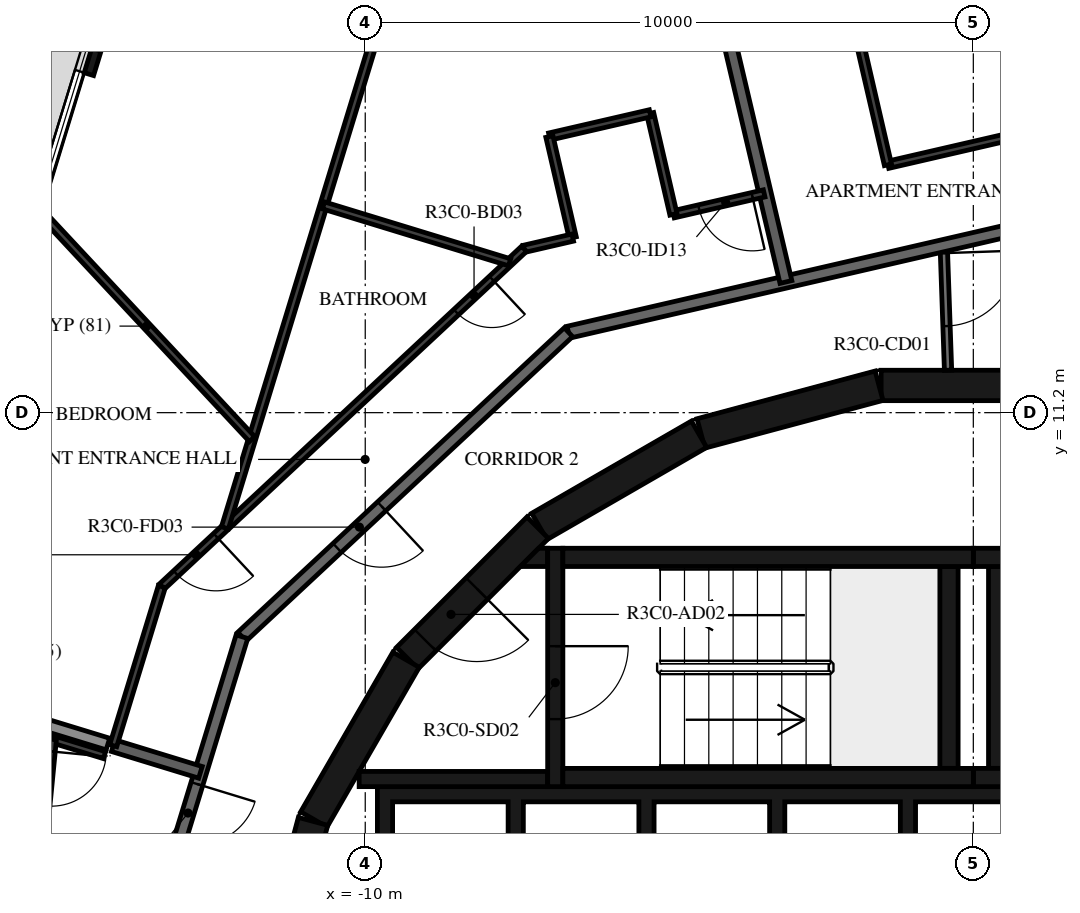
"""IFC4 building model, lengths in metres.
Left out: names, types, materials, properties, quantities, classifications, styles, units other than length and angle.
Written with IfcOpenShell. Run it as: python <this file> out.ifc"""

import sys

from ifc_helpers import new_model, si_unit, direction, frame, frame_2d, origin, place, context, subcontext, project, spatial, polyline, rectangle, outline, extrude, element, fill, save


model = new_model("IFC4")
c1 = context("Model", 3, precision=1e-05, world=origin(), true_north=direction((0.0, 1.0)))
c2 = subcontext(c1, "Body", "Model", "MODEL_VIEW")
j1 = project(units=[si_unit("LENGTHUNIT", "METRE"), si_unit("PLANEANGLEUNIT", "RADIAN")], contexts=[c1])
p1 = place(None, origin())
s1 = spatial("IfcSite", under=j1, at=p1, CompositionType="ELEMENT")
p2 = place(p1, origin())
s2 = spatial("IfcBuilding", under=s1, at=p2, CompositionType="ELEMENT")
p3 = place(p2, frame((0.0, 0.0, 134.4)))
s3 = spatial("IfcBuildingStorey", under=s2, at=p3, CompositionType="ELEMENT", Elevation=134.4)
p4 = place(p3, frame((-13.609, 19.827, 0.0), z_axis=(0.0, 0.0, 1.0), x_axis=(-0.292348395078, -0.956311882126, 0.0)))
e1 = element("IfcWall", 1, at=p4, inside=s3, PredefinedType="STANDARD", context=c2, shape_type="SweptSolid", body=[
    extrude(rectangle(XDim=3.2, YDim=0.16, at=frame_2d((1.6, 0.0))), origin(), (0.0, 0.0, 1.0), 3.12),
])
p5 = place(p4, frame((0.4, 0.0, 0.0)))
e2 = element("IfcOpeningElement", 2, at=p5, cuts=e1, PredefinedType="OPENING", context=c2, shape_type="SweptSolid", body=[
    extrude(rectangle(XDim=2.4, YDim=2.4, at=frame_2d((1.2, 1.2))), frame((0.0, 0.09, 0.0), z_axis=(0.0, -1.0, 0.0), x_axis=(1.0, 0.0, 0.0)), (0.0, 0.0, 1.0), 0.18),
])
for number, where, z_axis, x_axis in (
    (3, (1.516, 11.647, 0.0), (0.0, 0.0, 1.0), (-1.0, 0.0, 0.0)),
    (4, (-1.55, 11.643, 0.0), (0.0, 0.0, 1.0), (-0.966, -0.259, 0.0)),
    (5, (-4.51, 10.845, 0.0), (0.0, 0.0, 1.0), (-0.866, -0.5, 0.0)),
):
    element("IfcWall", number, at=place(p3, frame(where, z_axis=z_axis, x_axis=x_axis)), inside=s3, PredefinedType="SHEAR", context=c2, shape_type="SweptSolid", body=[
        extrude(rectangle(XDim=3.033, YDim=0.5, at=frame_2d((1.516, 0.0))), origin(), (0.0, 0.0, 1.0), 3.12),
    ])
p6 = place(p3, frame((-7.164, 9.308, 0.0), z_axis=(0.0, 0.0, 1.0), x_axis=(-0.707106781187, -0.707106781187, 0.0)))
e6 = element("IfcWall", 6, at=p6, inside=s3, PredefinedType="SHEAR", context=c2, shape_type="SweptSolid", body=[
    extrude(rectangle(XDim=3.032, YDim=0.5, at=frame_2d((1.516, 0.0))), origin(), (0.0, 0.0, 1.0), 3.12),
])
p7 = place(p6, frame((1.416, 0.0, 0.0)))
e7 = element("IfcOpeningElement", 7, at=p7, cuts=e6, PredefinedType="OPENING", context=c2, shape_type="SweptSolid", body=[
    extrude(rectangle(XDim=1.2, YDim=2.1, at=frame_2d((0.6, 1.05))), frame((0.0, 0.26, 0.0), z_axis=(0.0, -1.0, 0.0), x_axis=(1.0, 0.0, 0.0)), (0.0, 0.0, 1.0), 0.52),
])
for number, where, z_axis, x_axis in (
    (8, (-9.329, 7.137, 0.0), (0.0, 0.0, 1.0), (-0.5, -0.866, 0.0)),
    (9, (-10.858, 4.479, 0.0), (0.0, 0.0, 1.0), (-0.259, -0.966, 0.0)),
):
    element("IfcWall", number, at=place(p3, frame(where, z_axis=z_axis, x_axis=x_axis)), inside=s3, PredefinedType="SHEAR", context=c2, shape_type="SweptSolid", body=[
        extrude(rectangle(XDim=3.033, YDim=0.5, at=frame_2d((1.516, 0.0))), origin(), (0.0, 0.0, 1.0), 3.12),
    ])
for number, where, z_axis, x_axis in (
    (10, (0.0, 5.2, 0.0), (0.0, 0.0, 1.0), (1.0, 0.0, 0.0)),
    (11, (0.0, 8.82, 0.0), (0.0, 0.0, 1.0), (1.0, 0.0, 0.0)),
):
    element("IfcWall", number, at=place(p3, frame(where, z_axis=z_axis, x_axis=x_axis)), inside=s3, PredefinedType="SHEAR", context=c2, shape_type="SweptSolid", body=[
        extrude(rectangle(XDim=6.75, YDim=0.3, at=frame_2d((3.375, 0.0))), origin(), (0.0, 0.0, 1.0), 3.12),
    ])
p8 = place(p3, frame((0.4, 5.35, 0.0), z_axis=(0.0, 0.0, 1.0), x_axis=(0.0, 1.0, 0.0)))
e12 = element("IfcWall", 12, at=p8, inside=s3, PredefinedType="SHEAR", context=c2, shape_type="SweptSolid", body=[
    extrude(rectangle(XDim=3.32, YDim=0.3, at=frame_2d((1.66, 0.0))), origin(), (0.0, 0.0, 1.0), 3.12),
])
for number, where, z_axis, x_axis in (
    (13, (-6.75, 5.2, 0.0), (0.0, 0.0, 1.0), (1.0, 0.0, 0.0)),
    (14, (-6.75, 8.82, 0.0), (0.0, 0.0, 1.0), (1.0, 0.0, 0.0)),
):
    element("IfcWall", number, at=place(p3, frame(where, z_axis=z_axis, x_axis=x_axis)), inside=s3, PredefinedType="SHEAR", context=c2, shape_type="SweptSolid", body=[
        extrude(rectangle(XDim=6.75, YDim=0.3, at=frame_2d((3.375, 0.0))), origin(), (0.0, 0.0, 1.0), 3.12),
    ])
p9 = place(p3, frame((-0.4, 5.35, 0.0), z_axis=(0.0, 0.0, 1.0), x_axis=(0.0, 1.0, 0.0)))
e15 = element("IfcWall", 15, at=p9, inside=s3, PredefinedType="SHEAR", context=c2, shape_type="SweptSolid", body=[
    extrude(rectangle(XDim=3.32, YDim=0.3, at=frame_2d((1.66, 0.0))), origin(), (0.0, 0.0, 1.0), 3.12),
])
p10 = place(p3, frame((-6.875, 8.97, 0.0), z_axis=(0.0, 0.0, 1.0), x_axis=(0.0, -1.0, 0.0)))
e16 = element("IfcWall", 16, at=p10, inside=s3, PredefinedType="SHEAR", context=c2, shape_type="SweptSolid", body=[
    extrude(rectangle(XDim=3.92, YDim=0.25, at=frame_2d((1.96, 0.0))), origin(), (0.0, 0.0, 1.0), 3.12),
])
p11 = place(p10, frame((1.61, 0.0, 0.0)))
e17 = element("IfcOpeningElement", 17, at=p11, cuts=e16, PredefinedType="OPENING", context=c2, shape_type="SweptSolid", body=[
    extrude(rectangle(XDim=1.2, YDim=2.1, at=frame_2d((0.6, 1.05))), frame((0.0, 0.135, 0.0), z_axis=(0.0, -1.0, 0.0), x_axis=(1.0, 0.0, 0.0)), (0.0, 0.0, 1.0), 0.27),
])
p12 = place(p3, frame((-7.0, 5.175, 0.0), z_axis=(0.0, 0.0, 1.0), x_axis=(-1.0, 0.0, 0.0)))
e18 = element("IfcWall", 18, at=p12, inside=s3, PredefinedType="SHEAR", context=c2, shape_type="SweptSolid", body=[
    extrude(rectangle(XDim=3.1, YDim=0.25, at=frame_2d((1.55, 0.0))), origin(), (0.0, 0.0, 1.0), 3.12),
])
p13 = place(p3, origin())
e19 = element("IfcWall", 19, at=p13, inside=s3, PredefinedType="SHEAR", context=c2, shape_type="SweptSolid", body=[
    extrude(outline(polyline([(-7.148, 8.97), (-7.0, 8.97), (-7.0, 8.67), (-7.448, 8.67), (-7.148, 8.97)])), origin(), (0.0, 0.0, 1.0), 3.12),
])
p14 = place(p3, origin())
e20 = element("IfcWall", 20, at=p14, inside=s3, PredefinedType="SHEAR", context=c2, shape_type="SweptSolid", body=[
    extrude(outline(polyline([(-9.55, 4.8), (-7.65, 4.8), (-7.65, 1.9), (-7.4, 1.9), (-7.4, 4.8), (-5.5, 4.8), (-5.5, 1.9), (-5.25, 1.9), (-5.25, 4.8), (-3.35, 4.8), (-3.35, 1.9), (-3.1, 1.9), (-3.1, 4.8), (-1.2, 4.8), (-1.2, 1.9), (-0.95, 1.9), (-0.95, 4.8), (0.95, 4.8), (0.95, 1.9), (1.2, 1.9), (1.2, 4.8), (3.1, 4.8), (3.1, 1.9), (3.35, 1.9), (3.35, 4.8), (5.25, 4.8), (5.25, 1.9), (5.5, 1.9), (5.5, 4.8), (7.4, 4.8), (7.4, 1.9), (7.65, 1.9), (7.65, 4.8), (9.55, 4.8), (9.55, 1.9), (9.8, 1.9), (9.8, 4.8), (9.8, 5.05), (-9.8, 5.05), (-9.8, 4.8), (-9.8, 1.9), (-9.55, 1.9), (-9.55, 4.8)])), origin(), (0.0, 0.0, 1.0), 3.12),
])
p15 = place(p3, frame((-0.487, 13.948, 0.0), z_axis=(0.0, 0.0, 1.0), x_axis=(0.034859752231, -0.999392214135, 0.0)))
e21 = element("IfcWall", 21, at=p15, inside=s3, PredefinedType="PARTITIONING", context=c2, shape_type="SweptSolid", body=[
    extrude(rectangle(XDim=2.052, YDim=0.12, at=frame_2d((1.026, 0.0))), origin(), (0.0, 0.0, 1.0), 3.12),
])
p16 = place(p15, frame((0.125, 0.0, 0.0)))
e22 = element("IfcOpeningElement", 22, at=p16, cuts=e21, PredefinedType="OPENING", context=c2, shape_type="SweptSolid", body=[
    extrude(rectangle(XDim=1.2, YDim=2.1, at=frame_2d((0.6, 1.05))), frame((0.0, 0.07, 0.0), z_axis=(0.0, -1.0, 0.0), x_axis=(1.0, 0.0, 0.0)), (0.0, 0.0, 1.0), 0.14),
])
p17 = place(p3, frame((0.495, 14.175, 0.0), z_axis=(0.0, 0.0, 1.0), x_axis=(-0.974376622151, -0.224922649383, 0.0)))
e23 = element("IfcWall", 23, at=p17, inside=s3, PredefinedType="STANDARD", context=c2, shape_type="SweptSolid", body=[
    extrude(rectangle(XDim=7.342, YDim=0.2, at=frame_2d((3.671, 0.0))), origin(), (0.0, 0.0, 1.0), 3.12),
])
p18 = place(p3, frame((-6.659, 12.523, 0.0), z_axis=(0.0, 0.0, 1.0), x_axis=(-0.731350455479, -0.682001841105, 0.0)))
e24 = element("IfcWall", 24, at=p18, inside=s3, PredefinedType="STANDARD", context=c2, shape_type="SweptSolid", body=[
    extrude(rectangle(XDim=7.342, YDim=0.2, at=frame_2d((3.671, 0.0))), origin(), (0.0, 0.0, 1.0), 3.12),
])
p19 = place(p18, frame((4.2, 0.0, 0.0)))
e25 = element("IfcOpeningElement", 25, at=p19, cuts=e24, PredefinedType="OPENING", context=c2, shape_type="SweptSolid", body=[
    extrude(rectangle(XDim=1.0, YDim=2.1, at=frame_2d((0.5, 1.05))), frame((0.0, 0.11, 0.0), z_axis=(0.0, -1.0, 0.0), x_axis=(1.0, 0.0, 0.0)), (0.0, 0.0, 1.0), 0.22),
])
p20 = place(p3, frame((-12.028, 7.516, 0.0), z_axis=(0.0, 0.0, 1.0), x_axis=(-0.292365533182, -0.956306642771, 0.0)))
e26 = element("IfcWall", 26, at=p20, inside=s3, PredefinedType="STANDARD", context=c2, shape_type="SweptSolid", body=[
    extrude(rectangle(XDim=7.342, YDim=0.2, at=frame_2d((3.671, 0.0))), origin(), (0.0, 0.0, 1.0), 3.12),
])
p21 = place(p20, frame((2.533, 0.0, 0.0)))
e27 = element("IfcOpeningElement", 27, at=p21, cuts=e26, PredefinedType="OPENING", context=c2, shape_type="SweptSolid", body=[
    extrude(rectangle(XDim=1.0, YDim=2.1, at=frame_2d((0.5, 1.05))), frame((0.0, 0.11, 0.0), z_axis=(0.0, -1.0, 0.0), x_axis=(1.0, 0.0, 0.0)), (0.0, 0.0, 1.0), 0.22),
])
p22 = place(p3, frame((-4.281, 18.448, 0.0), z_axis=(0.0, 0.0, 1.0), x_axis=(0.228867856942, -0.973457499873, 0.0)))
e28 = element("IfcWall", 28, at=p22, inside=s3, PredefinedType="STANDARD", context=c2, shape_type="SweptSolid", body=[
    extrude(rectangle(XDim=5.238, YDim=0.2, at=frame_2d((2.619, 0.0))), origin(), (0.0, 0.0, 1.0), 3.12),
])
p23 = place(p3, frame((-14.145, 5.724, 0.0), z_axis=(0.0, 0.0, 1.0), x_axis=(0.956266872747, -0.292495586439, 0.0)))
e29 = element("IfcWall", 29, at=p23, inside=s3, PredefinedType="STANDARD", context=c2, shape_type="SweptSolid", body=[
    extrude(rectangle(XDim=1.5, YDim=0.2, at=frame_2d((0.75, 0.0))), origin(), (0.0, 0.0, 1.0), 3.12),
])
p24 = place(p3, frame((-17.674, 6.803, 0.0), z_axis=(0.0, 0.0, 1.0), x_axis=(0.956293645939, -0.292408041504, 0.0)))
e30 = element("IfcWall", 30, at=p24, inside=s3, PredefinedType="STANDARD", context=c2, shape_type="SweptSolid", body=[
    extrude(rectangle(XDim=3.6, YDim=0.2, at=frame_2d((1.8, 0.0))), origin(), (0.0, 0.0, 1.0), 2.73),
])
p25 = place(p3, frame((0.549, 15.727, 0.0), z_axis=(0.0, 0.0, 1.0), x_axis=(-0.97436861061, -0.224957352975, 0.0)))
e31 = element("IfcWall", 31, at=p25, inside=s3, PredefinedType="PARTITIONING", context=c2, shape_type="SweptSolid", body=[
    extrude(rectangle(XDim=2.004, YDim=0.12, at=frame_2d((1.002, 0.0))), origin(), (0.0, 0.0, 1.0), 3.12),
])
p26 = place(p3, frame((-1.404, 15.276, 0.0), z_axis=(0.0, 0.0, 1.0), x_axis=(-0.224947305813, 0.974370930194, 0.0)))
e32 = element("IfcWall", 32, at=p26, inside=s3, PredefinedType="PARTITIONING", context=c2, shape_type="SweptSolid", body=[
    extrude(rectangle(XDim=5.28, YDim=0.12, at=frame_2d((2.64, 0.0))), origin(), (0.0, 0.0, 1.0), 3.12),
])
p27 = place(p3, frame((-1.539, 24.071, 0.0), z_axis=(0.0, 0.0, 1.0), x_axis=(0.68200220595, -0.731350115252, 0.0)))
e33 = element("IfcWall", 33, at=p27, inside=s3, PredefinedType="PARTITIONING", context=c2, shape_type="SweptSolid", body=[
    extrude(rectangle(XDim=17.316, YDim=0.12, at=frame_2d((8.658, 0.0))), origin(), (0.0, 0.0, 1.0), 3.12),
])
p28 = place(p27, frame((3.323, 0.0, 0.0)))
e34 = element("IfcOpeningElement", 34, at=p28, cuts=e33, PredefinedType="OPENING", context=c2, shape_type="SweptSolid", body=[
    extrude(rectangle(XDim=0.9, YDim=2.1, at=frame_2d((0.45, 1.05))), frame((0.0, 0.07, 0.0), z_axis=(0.0, -1.0, 0.0), x_axis=(1.0, 0.0, 0.0)), (0.0, 0.0, 1.0), 0.14),
])
p29 = place(p27, frame((0.2, 0.0, 0.0)))
e35 = element("IfcOpeningElement", 35, at=p29, cuts=e33, PredefinedType="OPENING", context=c2, shape_type="SweptSolid", body=[
    extrude(rectangle(XDim=0.9, YDim=2.1, at=frame_2d((0.45, 1.05))), frame((0.0, 0.07, 0.0), z_axis=(0.0, -1.0, 0.0), x_axis=(1.0, 0.0, 0.0)), (0.0, 0.0, 1.0), 0.14),
])
p30 = place(p3, frame((-3.44, 14.806, 0.0), z_axis=(0.0, 0.0, 1.0), x_axis=(-0.974356244071, -0.225010910046, 0.0)))
e36 = element("IfcWall", 36, at=p30, inside=s3, PredefinedType="PARTITIONING", context=c2, shape_type="SweptSolid", body=[
    extrude(rectangle(XDim=1.531, YDim=0.12, at=frame_2d((0.766, 0.0))), origin(), (0.0, 0.0, 1.0), 3.12),
])
p31 = place(p30, frame((0.2, 0.0, 0.0)))
e37 = element("IfcOpeningElement", 37, at=p31, cuts=e36, PredefinedType="OPENING", context=c2, shape_type="SweptSolid", body=[
    extrude(rectangle(XDim=0.9, YDim=2.1, at=frame_2d((0.45, 1.05))), frame((0.0, 0.07, 0.0), z_axis=(0.0, -1.0, 0.0), x_axis=(1.0, 0.0, 0.0)), (0.0, 0.0, 1.0), 0.14),
])
p32 = place(p3, frame((-4.931, 14.461, 0.0), z_axis=(0.0, 0.0, 1.0), x_axis=(-0.224911785629, 0.974379129849, 0.0)))
e38 = element("IfcWall", 38, at=p32, inside=s3, PredefinedType="PARTITIONING", context=c2, shape_type="SweptSolid", body=[
    extrude(rectangle(XDim=1.705, YDim=0.12, at=frame_2d((0.853, 0.0))), origin(), (0.0, 0.0, 1.0), 3.12),
])
p33 = place(p3, frame((-5.315, 16.123, 0.0), z_axis=(0.0, 0.0, 1.0), x_axis=(-0.974352456598, -0.225027310168, 0.0)))
e39 = element("IfcWall", 39, at=p33, inside=s3, PredefinedType="PARTITIONING", context=c2, shape_type="SweptSolid", body=[
    extrude(rectangle(XDim=1.7, YDim=0.12, at=frame_2d((0.85, 0.0))), origin(), (0.0, 0.0, 1.0), 3.12),
])
p34 = place(p3, frame((-6.971, 15.74, 0.0), z_axis=(0.0, 0.0, 1.0), x_axis=(0.224943164347, -0.974371886301, 0.0)))
e40 = element("IfcWall", 40, at=p34, inside=s3, PredefinedType="PARTITIONING", context=c2, shape_type="SweptSolid", body=[
    extrude(rectangle(XDim=1.705, YDim=0.12, at=frame_2d((0.853, 0.0))), origin(), (0.0, 0.0, 1.0), 3.12),
])
p35 = place(p3, frame((-6.588, 14.079, 0.0), z_axis=(0.0, 0.0, 1.0), x_axis=(-0.974391195695, -0.224859506699, 0.0)))
e41 = element("IfcWall", 41, at=p35, inside=s3, PredefinedType="PARTITIONING", context=c2, shape_type="SweptSolid", body=[
    extrude(rectangle(XDim=0.821, YDim=0.12, at=frame_2d((0.41, 0.0))), origin(), (0.0, 0.0, 1.0), 3.12),
])
p36 = place(p3, frame((-7.388, 13.894, 0.0), z_axis=(0.0, 0.0, 1.0), x_axis=(-0.731357186721, -0.681994622729, 0.0)))
e42 = element("IfcWall", 42, at=p36, inside=s3, PredefinedType="PARTITIONING", context=c2, shape_type="SweptSolid", body=[
    extrude(rectangle(XDim=8.146, YDim=0.12, at=frame_2d((4.073, 0.0))), origin(), (0.0, 0.0, 1.0), 3.12),
])
p37 = place(p36, frame((0.725, 0.0, 0.0)))
e43 = element("IfcOpeningElement", 43, at=p37, cuts=e42, PredefinedType="OPENING", context=c2, shape_type="SweptSolid", body=[
    extrude(rectangle(XDim=0.8, YDim=2.1, at=frame_2d((0.4, 1.05))), frame((0.0, 0.07, 0.0), z_axis=(0.0, -1.0, 0.0), x_axis=(1.0, 0.0, 0.0)), (0.0, 0.0, 1.0), 0.14),
])
p38 = place(p36, frame((6.927, 0.0, 0.0)))
e44 = element("IfcOpeningElement", 44, at=p38, cuts=e42, PredefinedType="OPENING", context=c2, shape_type="SweptSolid", body=[
    extrude(rectangle(XDim=0.9, YDim=2.1, at=frame_2d((0.45, 1.05))), frame((0.0, 0.07, 0.0), z_axis=(0.0, -1.0, 0.0), x_axis=(1.0, 0.0, 0.0)), (0.0, 0.0, 1.0), 0.14),
])
p39 = place(p3, frame((-13.345, 8.339, 0.0), z_axis=(0.0, 0.0, 1.0), x_axis=(-0.292316072367, -0.956321762712, 0.0)))
e45 = element("IfcWall", 45, at=p39, inside=s3, PredefinedType="PARTITIONING", context=c2, shape_type="SweptSolid", body=[
    extrude(rectangle(XDim=2.734, YDim=0.12, at=frame_2d((1.367, 0.0))), origin(), (0.0, 0.0, 1.0), 3.12),
])
p40 = place(p3, frame((-8.417, 22.031, 0.0), z_axis=(0.0, 0.0, 1.0), x_axis=(-0.292371891841, -0.956304698755, 0.0)))
e46 = element("IfcWall", 46, at=p40, inside=s3, PredefinedType="PARTITIONING", context=c2, shape_type="SweptSolid", body=[
    extrude(rectangle(XDim=13.306, YDim=0.12, at=frame_2d((6.653, 0.0))), origin(), (0.0, 0.0, 1.0), 3.12),
])
p41 = place(p40, frame((2.777, 0.0, 0.0)))
e47 = element("IfcOpeningElement", 47, at=p41, cuts=e46, PredefinedType="OPENING", context=c2, shape_type="SweptSolid", body=[
    extrude(rectangle(XDim=0.9, YDim=2.1, at=frame_2d((0.45, 1.05))), frame((0.0, 0.07, 0.0), z_axis=(0.0, -1.0, 0.0), x_axis=(1.0, 0.0, 0.0)), (0.0, 0.0, 1.0), 0.14),
])
p42 = place(p3, frame((-10.687, 14.608, 0.0), z_axis=(0.0, 0.0, 1.0), x_axis=(0.956295309419, -0.292402601189, 0.0)))
e48 = element("IfcWall", 48, at=p42, inside=s3, PredefinedType="PARTITIONING", context=c2, shape_type="SweptSolid", body=[
    extrude(rectangle(XDim=3.201, YDim=0.12, at=frame_2d((1.601, 0.0))), origin(), (0.0, 0.0, 1.0), 3.12),
])
p43 = place(p3, frame((-15.327, 14.481, 0.0), z_axis=(0.0, 0.0, 1.0), x_axis=(0.68197575128, -0.731374783997, 0.0)))
e49 = element("IfcWall", 49, at=p43, inside=s3, PredefinedType="PARTITIONING", context=c2, shape_type="SweptSolid", body=[
    extrude(rectangle(XDim=5.081, YDim=0.12, at=frame_2d((2.54, 0.0))), origin(), (0.0, 0.0, 1.0), 3.12),
])
p44 = place(p3, frame((-14.287, 5.568, 0.0), z_axis=(0.0, 0.0, 1.0), x_axis=(-0.956287662261, 0.292427609859, 0.0)))
e50 = element("IfcWall", 50, at=p44, inside=s3, PredefinedType="PARTITIONING", context=c2, shape_type="SweptSolid", body=[
    extrude(rectangle(XDim=0.89, YDim=0.12, at=frame_2d((0.445, 0.0))), origin(), (0.0, 0.0, 1.0), 3.12),
])
p45 = place(p3, frame((-15.138, 5.828, 0.0), z_axis=(0.0, 0.0, 1.0), x_axis=(-0.096967255409, -0.995287572201, 0.0)))
e51 = element("IfcWall", 51, at=p45, inside=s3, PredefinedType="PARTITIONING", context=c2, shape_type="SweptSolid", body=[
    extrude(rectangle(XDim=4.489, YDim=0.12, at=frame_2d((2.245, 0.0))), origin(), (0.0, 0.0, 1.0), 3.12),
])
p46 = place(p45, frame((0.2, 0.0, 0.0)))
e52 = element("IfcOpeningElement", 52, at=p46, cuts=e51, PredefinedType="OPENING", context=c2, shape_type="SweptSolid", body=[
    extrude(rectangle(XDim=0.9, YDim=2.1, at=frame_2d((0.45, 1.05))), frame((0.0, 0.07, 0.0), z_axis=(0.0, -1.0, 0.0), x_axis=(1.0, 0.0, 0.0)), (0.0, 0.0, 1.0), 0.14),
])
p47 = place(p11, origin())
e53 = element("IfcDoor", 53, at=p47, inside=s3, OperationType="SINGLE_SWING_LEFT", PredefinedType="DOOR", context=c2, shape_type="SweptSolid", body=[
    extrude(rectangle(XDim=1.2, YDim=2.1, at=frame_2d((0.6, 1.05))), frame((0.0, 0.025, 0.0), z_axis=(0.0, -1.0, 0.0), x_axis=(1.0, 0.0, 0.0)), (0.0, 0.0, 1.0), 0.05),
])
fill(e17, e53)
p48 = place(p7, origin())
e54 = element("IfcDoor", 54, at=p48, inside=s3, OperationType="SINGLE_SWING_RIGHT", PredefinedType="DOOR", context=c2, shape_type="SweptSolid", body=[
    extrude(rectangle(XDim=1.2, YDim=2.1, at=frame_2d((0.6, 1.05))), frame((0.0, 0.025, 0.0), z_axis=(0.0, -1.0, 0.0), x_axis=(1.0, 0.0, 0.0)), (0.0, 0.0, 1.0), 0.05),
])
fill(e7, e54)
p49 = place(p19, origin())
e55 = element("IfcDoor", 55, at=p49, inside=s3, OperationType="SINGLE_SWING_LEFT", PredefinedType="DOOR", context=c2, shape_type="SweptSolid", body=[
    extrude(rectangle(XDim=1.0, YDim=2.1, at=frame_2d((0.5, 1.05))), frame((0.0, 0.025, 0.0), z_axis=(0.0, -1.0, 0.0), x_axis=(1.0, 0.0, 0.0)), (0.0, 0.0, 1.0), 0.05),
])
fill(e25, e55)
p50 = place(p31, origin())
e56 = element("IfcDoor", 56, at=p50, inside=s3, OperationType="SINGLE_SWING_LEFT", PredefinedType="DOOR", context=c2, shape_type="SweptSolid", body=[
    extrude(rectangle(XDim=0.9, YDim=2.1, at=frame_2d((0.45, 1.05))), frame((0.0, 0.025, 0.0), z_axis=(0.0, -1.0, 0.0), x_axis=(1.0, 0.0, 0.0)), (0.0, 0.0, 1.0), 0.05),
])
fill(e37, e56)
p51 = place(p37, origin())
e57 = element("IfcDoor", 57, at=p51, inside=s3, OperationType="SINGLE_SWING_LEFT", PredefinedType="DOOR", context=c2, shape_type="SweptSolid", body=[
    extrude(rectangle(XDim=0.8, YDim=2.1, at=frame_2d((0.4, 1.05))), frame((0.0, 0.025, 0.0), z_axis=(0.0, -1.0, 0.0), x_axis=(1.0, 0.0, 0.0)), (0.0, 0.0, 1.0), 0.05),
])
fill(e43, e57)
p52 = place(p38, origin())
e58 = element("IfcDoor", 58, at=p52, inside=s3, OperationType="SINGLE_SWING_LEFT", PredefinedType="DOOR", context=c2, shape_type="SweptSolid", body=[
    extrude(rectangle(XDim=0.9, YDim=2.1, at=frame_2d((0.45, 1.05))), frame((0.0, 0.025, 0.0), z_axis=(0.0, -1.0, 0.0), x_axis=(1.0, 0.0, 0.0)), (0.0, 0.0, 1.0), 0.05),
])
fill(e44, e58)
p53 = place(p21, origin())
e59 = element("IfcDoor", 59, at=p53, inside=s3, OperationType="SINGLE_SWING_LEFT", PredefinedType="DOOR", context=c2, shape_type="SweptSolid", body=[
    extrude(rectangle(XDim=1.0, YDim=2.1, at=frame_2d((0.5, 1.05))), frame((0.0, 0.025, 0.0), z_axis=(0.0, -1.0, 0.0), x_axis=(1.0, 0.0, 0.0)), (0.0, 0.0, 1.0), 0.05),
])
fill(e27, e59)
p54 = place(p46, origin())
e60 = element("IfcDoor", 60, at=p54, inside=s3, OperationType="SINGLE_SWING_LEFT", PredefinedType="DOOR", context=c2, shape_type="SweptSolid", body=[
    extrude(rectangle(XDim=0.9, YDim=2.1, at=frame_2d((0.45, 1.05))), frame((0.0, 0.025, 0.0), z_axis=(0.0, -1.0, 0.0), x_axis=(1.0, 0.0, 0.0)), (0.0, 0.0, 1.0), 0.05),
])
fill(e52, e60)
p55 = place(p16, origin())
e61 = element("IfcDoor", 61, at=p55, inside=s3, OperationType="DOUBLE_DOOR_SINGLE_SWING", PredefinedType="DOOR", context=c2, shape_type="SweptSolid", body=[
    extrude(rectangle(XDim=1.2, YDim=2.1, at=frame_2d((0.6, 1.05))), frame((0.0, 0.025, 0.0), z_axis=(0.0, -1.0, 0.0), x_axis=(1.0, 0.0, 0.0)), (0.0, 0.0, 1.0), 0.05),
])
fill(e22, e61)
save(model, sys.argv[1])
